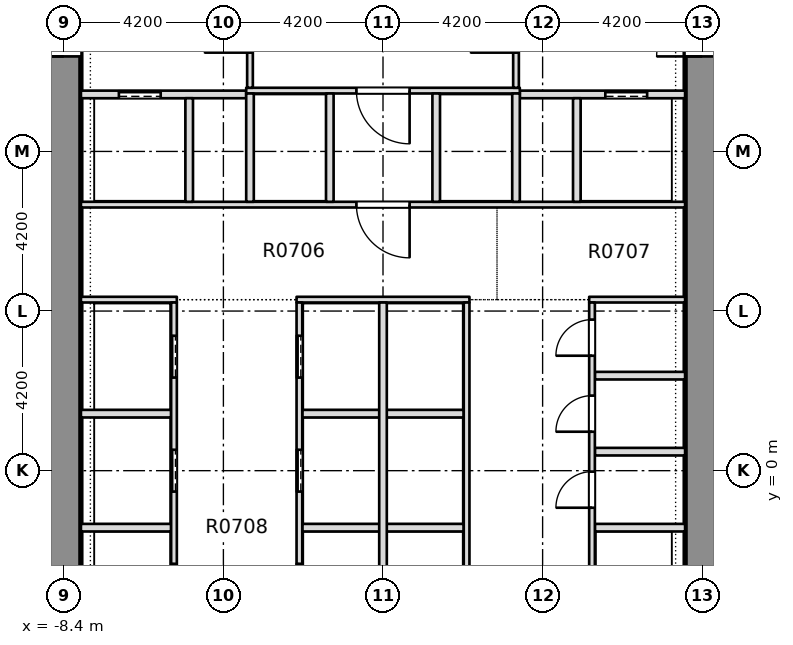
"""IFC4 building model, lengths in metres.
Left out: names, types, materials, properties, quantities, classifications, styles, units other than length and angle.
Written with IfcOpenShell. Run it as: python <this file> out.ifc"""

import sys

from ifc_helpers import new_model, si_unit, direction, frame, frame_2d, origin, place, context, subcontext, project, spatial, rectangle, extrude, element, fill, save


model = new_model("IFC4")
c1 = context("Model", 3, precision=1e-05, world=origin(), true_north=direction((0.0, 1.0)))
c2 = subcontext(c1, "Body", "Model", "MODEL_VIEW")
j1 = project(units=[si_unit("LENGTHUNIT", "METRE"), si_unit("PLANEANGLEUNIT", "RADIAN")], contexts=[c1])
p1 = place(None, origin())
s1 = spatial("IfcSite", under=j1, at=p1, CompositionType="ELEMENT")
p2 = place(p1, origin())
s2 = spatial("IfcBuilding", under=s1, at=p2, CompositionType="ELEMENT")
p3 = place(p2, frame((0.0, 0.0, 37.95)))
s3 = spatial("IfcBuildingStorey", under=s2, at=p3, CompositionType="ELEMENT", Elevation=37.95)
p4 = place(p3, frame((-8.4, -7.5, -0.32), z_axis=(0.0, 0.0, 1.0), x_axis=(0.0, 1.0, 0.0)))
e1 = element("IfcWall", 1, at=p4, inside=s3, PredefinedType="SHEAR", context=c2, shape_type="SweptSolid", body=[
    extrude(rectangle(XDim=28.35, YDim=0.9, at=frame_2d((14.175, 0.0))), origin(), (0.0, 0.0, 1.0), 3.45),
])
p5 = place(p4, frame((18.4, 0.0, 0.32)))
e2 = element("IfcOpeningElement", 2, at=p5, cuts=e1, PredefinedType="OPENING", context=c2, shape_type="SweptSolid", body=[
    extrude(rectangle(XDim=1.2, YDim=2.1, at=frame_2d((0.6, 1.05))), frame((0.0, 0.46, 0.0), z_axis=(0.0, -1.0, 0.0), x_axis=(1.0, 0.0, 0.0)), (0.0, 0.0, 1.0), 0.92),
])
p6 = place(p3, frame((8.4, -7.5, -0.32), z_axis=(0.0, 0.0, 1.0), x_axis=(0.0, 1.0, 0.0)))
e3 = element("IfcWall", 3, at=p6, inside=s3, PredefinedType="SHEAR", context=c2, shape_type="SweptSolid", body=[
    extrude(rectangle(XDim=28.35, YDim=0.9, at=frame_2d((14.175, 0.0))), origin(), (0.0, 0.0, 1.0), 3.45),
])
p7 = place(p6, frame((18.4, 0.0, 0.32)))
e4 = element("IfcOpeningElement", 4, at=p7, cuts=e3, PredefinedType="OPENING", context=c2, shape_type="SweptSolid", body=[
    extrude(rectangle(XDim=1.2, YDim=2.1, at=frame_2d((0.6, 1.05))), frame((0.0, 0.46, 0.0), z_axis=(0.0, -1.0, 0.0), x_axis=(1.0, 0.0, 0.0)), (0.0, 0.0, 1.0), 0.92),
])
p8 = place(p3, frame((-7.949, -1.5, 0.0), z_axis=(0.0, 0.0, 1.0), x_axis=(1.0, 0.0, 0.0)))
e5 = element("IfcWall", 5, at=p8, inside=s3, PredefinedType="PARTITIONING", context=c2, shape_type="SweptSolid", body=[
    extrude(rectangle(XDim=2.374, YDim=0.2, at=frame_2d((1.187, 0.0))), origin(), (0.0, 0.0, 1.0), 3.13),
])
p9 = place(p3, frame((-2.125, -1.5, 0.0), z_axis=(0.0, 0.0, 1.0), x_axis=(1.0, 0.0, 0.0)))
e6 = element("IfcWall", 6, at=p9, inside=s3, PredefinedType="PARTITIONING", context=c2, shape_type="SweptSolid", body=[
    extrude(rectangle(XDim=4.25, YDim=0.2, at=frame_2d((2.125, 0.0))), origin(), (0.0, 0.0, 1.0), 3.13),
])
for number, where, z_axis, x_axis in (
    (7, (5.575, -1.5, 0.0), (0.0, 0.0, 1.0), (1.0, 0.0, 0.0)),
    (8, (5.575, 0.5, 0.0), (0.0, 0.0, 1.0), (1.0, 0.0, 0.0)),
    (9, (-7.949, 1.5, 0.0), (0.0, 0.0, 1.0), (1.0, 0.0, 0.0)),
):
    element("IfcWall", number, at=place(p3, frame(where, z_axis=z_axis, x_axis=x_axis)), inside=s3, PredefinedType="PARTITIONING", context=c2, shape_type="SweptSolid", body=[
        extrude(rectangle(XDim=2.374, YDim=0.2, at=frame_2d((1.187, 0.0))), origin(), (0.0, 0.0, 1.0), 3.13),
    ])
p10 = place(p3, frame((-2.125, 1.5, 0.0), z_axis=(0.0, 0.0, 1.0), x_axis=(1.0, 0.0, 0.0)))
e10 = element("IfcWall", 10, at=p10, inside=s3, PredefinedType="PARTITIONING", context=c2, shape_type="SweptSolid", body=[
    extrude(rectangle(XDim=4.25, YDim=0.2, at=frame_2d((2.125, 0.0))), origin(), (0.0, 0.0, 1.0), 3.13),
])
p11 = place(p3, frame((5.575, 2.5, 0.0), z_axis=(0.0, 0.0, 1.0), x_axis=(1.0, 0.0, 0.0)))
e11 = element("IfcWall", 11, at=p11, inside=s3, PredefinedType="PARTITIONING", context=c2, shape_type="SweptSolid", body=[
    extrude(rectangle(XDim=2.374, YDim=0.2, at=frame_2d((1.187, 0.0))), origin(), (0.0, 0.0, 1.0), 3.13),
])
p12 = place(p3, frame((-7.949, 4.5, 0.0), z_axis=(0.0, 0.0, 1.0), x_axis=(1.0, 0.0, 0.0)))
e12 = element("IfcWall", 12, at=p12, inside=s3, PredefinedType="PARTITIONING", context=c2, shape_type="SweptSolid", body=[
    extrude(rectangle(XDim=2.524, YDim=0.15, at=frame_2d((1.262, 0.0))), origin(), (0.0, 0.0, 1.0), 3.13),
])
p13 = place(p3, frame((-2.275, 4.5, 0.0), z_axis=(0.0, 0.0, 1.0), x_axis=(1.0, 0.0, 0.0)))
e13 = element("IfcWall", 13, at=p13, inside=s3, PredefinedType="PARTITIONING", context=c2, shape_type="SweptSolid", body=[
    extrude(rectangle(XDim=4.55, YDim=0.15, at=frame_2d((2.275, 0.0))), origin(), (0.0, 0.0, 1.0), 3.13),
])
p14 = place(p3, frame((5.425, 4.5, 0.0), z_axis=(0.0, 0.0, 1.0), x_axis=(1.0, 0.0, 0.0)))
e14 = element("IfcWall", 14, at=p14, inside=s3, PredefinedType="PARTITIONING", context=c2, shape_type="SweptSolid", body=[
    extrude(rectangle(XDim=2.524, YDim=0.15, at=frame_2d((1.262, 0.0))), origin(), (0.0, 0.0, 1.0), 3.13),
])
p15 = place(p3, frame((-7.949, 7.0, 0.0), z_axis=(0.0, 0.0, 1.0), x_axis=(1.0, 0.0, 0.0)))
e15 = element("IfcWall", 15, at=p15, inside=s3, PredefinedType="PARTITIONING", context=c2, shape_type="SweptSolid", body=[
    extrude(rectangle(XDim=15.898, YDim=0.15, at=frame_2d((7.949, 0.0))), origin(), (0.0, 0.0, 1.0), 3.13),
])
p16 = place(p15, frame((7.249, 0.0, 0.0)))
e16 = element("IfcOpeningElement", 16, at=p16, cuts=e15, PredefinedType="OPENING", context=c2, shape_type="SweptSolid", body=[
    extrude(rectangle(XDim=1.4, YDim=2.1, at=frame_2d((0.7, 1.05))), frame((0.0, 0.085, 0.0), z_axis=(0.0, -1.0, 0.0), x_axis=(1.0, 0.0, 0.0)), (0.0, 0.0, 1.0), 0.17),
])
p17 = place(p3, frame((-7.949, 9.9, 0.0), z_axis=(0.0, 0.0, 1.0), x_axis=(1.0, 0.0, 0.0)))
e17 = element("IfcWall", 17, at=p17, inside=s3, PredefinedType="PARTITIONING", context=c2, shape_type="SweptSolid", body=[
    extrude(rectangle(XDim=4.349, YDim=0.2, at=frame_2d((2.174, 0.0))), origin(), (0.0, 0.0, 1.0), 3.13),
])
p18 = place(p17, frame((0.999, 0.0, 0.0)))
e18 = element("IfcOpeningElement", 18, at=p18, cuts=e17, PredefinedType="OPENING", context=c2, shape_type="SweptSolid", body=[
    extrude(rectangle(XDim=1.1, YDim=2.1, at=frame_2d((0.55, 1.05))), frame((0.0, 0.11, 0.0), z_axis=(0.0, -1.0, 0.0), x_axis=(1.0, 0.0, 0.0)), (0.0, 0.0, 1.0), 0.22),
])
p19 = place(p3, frame((3.6, 9.9, 0.0), z_axis=(0.0, 0.0, 1.0), x_axis=(1.0, 0.0, 0.0)))
e19 = element("IfcWall", 19, at=p19, inside=s3, PredefinedType="PARTITIONING", context=c2, shape_type="SweptSolid", body=[
    extrude(rectangle(XDim=4.349, YDim=0.2, at=frame_2d((2.174, 0.0))), origin(), (0.0, 0.0, 1.0), 3.13),
])
p20 = place(p19, frame((2.25, 0.0, 0.0)))
e20 = element("IfcOpeningElement", 20, at=p20, cuts=e19, PredefinedType="OPENING", context=c2, shape_type="SweptSolid", body=[
    extrude(rectangle(XDim=1.1, YDim=2.1, at=frame_2d((0.55, 1.05))), frame((0.0, 0.11, 0.0), z_axis=(0.0, -1.0, 0.0), x_axis=(1.0, 0.0, 0.0)), (0.0, 0.0, 1.0), 0.22),
])
p21 = place(p3, frame((-3.6, 10.0, 0.0), z_axis=(0.0, 0.0, 1.0), x_axis=(1.0, 0.0, 0.0)))
e21 = element("IfcWall", 21, at=p21, inside=s3, PredefinedType="PARTITIONING", context=c2, shape_type="SweptSolid", body=[
    extrude(rectangle(XDim=7.2, YDim=0.15, at=frame_2d((3.6, 0.0))), origin(), (0.0, 0.0, 1.0), 3.13),
])
p22 = place(p21, frame((2.9, 0.0, 0.0)))
e22 = element("IfcOpeningElement", 22, at=p22, cuts=e21, PredefinedType="OPENING", context=c2, shape_type="SweptSolid", body=[
    extrude(rectangle(XDim=1.4, YDim=2.1, at=frame_2d((0.7, 1.05))), frame((0.0, 0.085, 0.0), z_axis=(0.0, -1.0, 0.0), x_axis=(1.0, 0.0, 0.0)), (0.0, 0.0, 1.0), 0.17),
])
p23 = place(p3, frame((-5.5, -7.499, 0.0), z_axis=(0.0, 0.0, 1.0), x_axis=(0.0, 1.0, 0.0)))
e23 = element("IfcWall", 23, at=p23, inside=s3, PredefinedType="PARTITIONING", context=c2, shape_type="SweptSolid", body=[
    extrude(rectangle(XDim=11.924, YDim=0.15, at=frame_2d((5.962, 0.0))), origin(), (0.0, 0.0, 1.0), 3.13),
])
p24 = place(p23, frame((0.949, 0.0, 0.0)))
e24 = element("IfcOpeningElement", 24, at=p24, cuts=e23, PredefinedType="OPENING", context=c2, shape_type="SweptSolid", body=[
    extrude(rectangle(XDim=1.1, YDim=2.1, at=frame_2d((0.55, 1.05))), frame((0.0, 0.085, 0.0), z_axis=(0.0, -1.0, 0.0), x_axis=(1.0, 0.0, 0.0)), (0.0, 0.0, 1.0), 0.17),
])
p25 = place(p23, frame((3.949, 0.0, 0.0)))
e25 = element("IfcOpeningElement", 25, at=p25, cuts=e23, PredefinedType="OPENING", context=c2, shape_type="SweptSolid", body=[
    extrude(rectangle(XDim=1.1, YDim=2.1, at=frame_2d((0.55, 1.05))), frame((0.0, 0.085, 0.0), z_axis=(0.0, -1.0, 0.0), x_axis=(1.0, 0.0, 0.0)), (0.0, 0.0, 1.0), 0.17),
])
p26 = place(p23, frame((6.949, 0.0, 0.0)))
e26 = element("IfcOpeningElement", 26, at=p26, cuts=e23, PredefinedType="OPENING", context=c2, shape_type="SweptSolid", body=[
    extrude(rectangle(XDim=1.1, YDim=2.1, at=frame_2d((0.55, 1.05))), frame((0.0, 0.085, 0.0), z_axis=(0.0, -1.0, 0.0), x_axis=(1.0, 0.0, 0.0)), (0.0, 0.0, 1.0), 0.17),
])
p27 = place(p23, frame((9.949, 0.0, 0.0)))
e27 = element("IfcOpeningElement", 27, at=p27, cuts=e23, PredefinedType="OPENING", context=c2, shape_type="SweptSolid", body=[
    extrude(rectangle(XDim=1.1, YDim=2.1, at=frame_2d((0.55, 1.05))), frame((0.0, 0.085, 0.0), z_axis=(0.0, -1.0, 0.0), x_axis=(1.0, 0.0, 0.0)), (0.0, 0.0, 1.0), 0.17),
])
p28 = place(p3, frame((-5.1, 7.075, 0.0), z_axis=(0.0, 0.0, 1.0), x_axis=(0.0, 1.0, 0.0)))
e28 = element("IfcWall", 28, at=p28, inside=s3, PredefinedType="PARTITIONING", context=c2, shape_type="SweptSolid", body=[
    extrude(rectangle(XDim=2.725, YDim=0.2, at=frame_2d((1.363, 0.0))), origin(), (0.0, 0.0, 1.0), 3.13),
])
p29 = place(p3, frame((-3.5, 7.075, 0.0), z_axis=(0.0, 0.0, 1.0), x_axis=(0.0, 1.0, 0.0)))
e29 = element("IfcWall", 29, at=p29, inside=s3, PredefinedType="PARTITIONING", context=c2, shape_type="SweptSolid", body=[
    extrude(rectangle(XDim=2.85, YDim=0.2, at=frame_2d((1.425, 0.0))), origin(), (0.0, 0.0, 1.0), 3.13),
])
p30 = place(p3, frame((-3.5, 10.075, 0.0), z_axis=(0.0, 0.0, 1.0), x_axis=(0.0, 1.0, 0.0)))
e30 = element("IfcWall", 30, at=p30, inside=s3, PredefinedType="PARTITIONING", context=c2, shape_type="SweptSolid", body=[
    extrude(rectangle(XDim=3.075, YDim=0.15, at=frame_2d((1.538, 0.0))), origin(), (0.0, 0.0, 1.0), 3.13),
])
p31 = place(p30, frame((0.925, 0.0, 0.0)))
e31 = element("IfcOpeningElement", 31, at=p31, cuts=e30, PredefinedType="OPENING", context=c2, shape_type="SweptSolid", body=[
    extrude(rectangle(XDim=1.2, YDim=2.1, at=frame_2d((0.6, 1.05))), frame((0.0, 0.085, 0.0), z_axis=(0.0, -1.0, 0.0), x_axis=(1.0, 0.0, 0.0)), (0.0, 0.0, 1.0), 0.17),
])
p32 = place(p3, frame((-2.2, -7.499, 0.0), z_axis=(0.0, 0.0, 1.0), x_axis=(0.0, 1.0, 0.0)))
e32 = element("IfcWall", 32, at=p32, inside=s3, PredefinedType="PARTITIONING", context=c2, shape_type="SweptSolid", body=[
    extrude(rectangle(XDim=11.924, YDim=0.15, at=frame_2d((5.962, 0.0))), origin(), (0.0, 0.0, 1.0), 3.13),
])
p33 = place(p32, frame((0.949, 0.0, 0.0)))
e33 = element("IfcOpeningElement", 33, at=p33, cuts=e32, PredefinedType="OPENING", context=c2, shape_type="SweptSolid", body=[
    extrude(rectangle(XDim=1.1, YDim=2.1, at=frame_2d((0.55, 1.05))), frame((0.0, 0.085, 0.0), z_axis=(0.0, -1.0, 0.0), x_axis=(1.0, 0.0, 0.0)), (0.0, 0.0, 1.0), 0.17),
])
p34 = place(p32, frame((3.949, 0.0, 0.0)))
e34 = element("IfcOpeningElement", 34, at=p34, cuts=e32, PredefinedType="OPENING", context=c2, shape_type="SweptSolid", body=[
    extrude(rectangle(XDim=1.1, YDim=2.1, at=frame_2d((0.55, 1.05))), frame((0.0, 0.085, 0.0), z_axis=(0.0, -1.0, 0.0), x_axis=(1.0, 0.0, 0.0)), (0.0, 0.0, 1.0), 0.17),
])
p35 = place(p32, frame((6.949, 0.0, 0.0)))
e35 = element("IfcOpeningElement", 35, at=p35, cuts=e32, PredefinedType="OPENING", context=c2, shape_type="SweptSolid", body=[
    extrude(rectangle(XDim=1.1, YDim=2.1, at=frame_2d((0.55, 1.05))), frame((0.0, 0.085, 0.0), z_axis=(0.0, -1.0, 0.0), x_axis=(1.0, 0.0, 0.0)), (0.0, 0.0, 1.0), 0.17),
])
p36 = place(p32, frame((9.949, 0.0, 0.0)))
e36 = element("IfcOpeningElement", 36, at=p36, cuts=e32, PredefinedType="OPENING", context=c2, shape_type="SweptSolid", body=[
    extrude(rectangle(XDim=1.1, YDim=2.1, at=frame_2d((0.55, 1.05))), frame((0.0, 0.085, 0.0), z_axis=(0.0, -1.0, 0.0), x_axis=(1.0, 0.0, 0.0)), (0.0, 0.0, 1.0), 0.17),
])
p37 = place(p3, frame((-1.4, 7.075, 0.0), z_axis=(0.0, 0.0, 1.0), x_axis=(0.0, 1.0, 0.0)))
e37 = element("IfcWall", 37, at=p37, inside=s3, PredefinedType="PARTITIONING", context=c2, shape_type="SweptSolid", body=[
    extrude(rectangle(XDim=2.85, YDim=0.2, at=frame_2d((1.425, 0.0))), origin(), (0.0, 0.0, 1.0), 3.13),
])
p38 = place(p3, frame((0.0, -7.499, 0.0), z_axis=(0.0, 0.0, 1.0), x_axis=(0.0, 1.0, 0.0)))
e38 = element("IfcWall", 38, at=p38, inside=s3, PredefinedType="PARTITIONING", context=c2, shape_type="SweptSolid", body=[
    extrude(rectangle(XDim=11.924, YDim=0.2, at=frame_2d((5.962, 0.0))), origin(), (0.0, 0.0, 1.0), 3.13),
])
p39 = place(p3, frame((1.4, 7.075, 0.0), z_axis=(0.0, 0.0, 1.0), x_axis=(0.0, 1.0, 0.0)))
e39 = element("IfcWall", 39, at=p39, inside=s3, PredefinedType="PARTITIONING", context=c2, shape_type="SweptSolid", body=[
    extrude(rectangle(XDim=2.85, YDim=0.2, at=frame_2d((1.425, 0.0))), origin(), (0.0, 0.0, 1.0), 3.13),
])
p40 = place(p3, frame((2.2, -7.499, 0.0), z_axis=(0.0, 0.0, 1.0), x_axis=(0.0, 1.0, 0.0)))
e40 = element("IfcWall", 40, at=p40, inside=s3, PredefinedType="PARTITIONING", context=c2, shape_type="SweptSolid", body=[
    extrude(rectangle(XDim=11.924, YDim=0.15, at=frame_2d((5.962, 0.0))), origin(), (0.0, 0.0, 1.0), 3.13),
])
p41 = place(p3, frame((3.5, 7.075, 0.0), z_axis=(0.0, 0.0, 1.0), x_axis=(0.0, 1.0, 0.0)))
e41 = element("IfcWall", 41, at=p41, inside=s3, PredefinedType="PARTITIONING", context=c2, shape_type="SweptSolid", body=[
    extrude(rectangle(XDim=2.85, YDim=0.2, at=frame_2d((1.425, 0.0))), origin(), (0.0, 0.0, 1.0), 3.13),
])
p42 = place(p3, frame((3.5, 10.075, 0.0), z_axis=(0.0, 0.0, 1.0), x_axis=(0.0, 1.0, 0.0)))
e42 = element("IfcWall", 42, at=p42, inside=s3, PredefinedType="PARTITIONING", context=c2, shape_type="SweptSolid", body=[
    extrude(rectangle(XDim=3.075, YDim=0.15, at=frame_2d((1.538, 0.0))), origin(), (0.0, 0.0, 1.0), 3.13),
])
p43 = place(p42, frame((0.925, 0.0, 0.0)))
e43 = element("IfcOpeningElement", 43, at=p43, cuts=e42, PredefinedType="OPENING", context=c2, shape_type="SweptSolid", body=[
    extrude(rectangle(XDim=1.2, YDim=2.1, at=frame_2d((0.6, 1.05))), frame((0.0, 0.085, 0.0), z_axis=(0.0, -1.0, 0.0), x_axis=(1.0, 0.0, 0.0)), (0.0, 0.0, 1.0), 0.17),
])
p44 = place(p3, frame((5.1, 7.075, 0.0), z_axis=(0.0, 0.0, 1.0), x_axis=(0.0, 1.0, 0.0)))
e44 = element("IfcWall", 44, at=p44, inside=s3, PredefinedType="PARTITIONING", context=c2, shape_type="SweptSolid", body=[
    extrude(rectangle(XDim=2.725, YDim=0.2, at=frame_2d((1.363, 0.0))), origin(), (0.0, 0.0, 1.0), 3.13),
])
p45 = place(p3, frame((5.5, -7.499, 0.0), z_axis=(0.0, 0.0, 1.0), x_axis=(0.0, 1.0, 0.0)))
e45 = element("IfcWall", 45, at=p45, inside=s3, PredefinedType="PARTITIONING", context=c2, shape_type="SweptSolid", body=[
    extrude(rectangle(XDim=11.924, YDim=0.15, at=frame_2d((5.962, 0.0))), origin(), (0.0, 0.0, 1.0), 3.13),
])
p46 = place(p45, frame((6.524, 0.0, 0.0)))
e46 = element("IfcOpeningElement", 46, at=p46, cuts=e45, PredefinedType="OPENING", context=c2, shape_type="SweptSolid", body=[
    extrude(rectangle(XDim=0.95, YDim=2.1, at=frame_2d((0.475, 1.05))), frame((0.0, 0.085, 0.0), z_axis=(0.0, -1.0, 0.0), x_axis=(1.0, 0.0, 0.0)), (0.0, 0.0, 1.0), 0.17),
])
p47 = place(p45, frame((8.524, 0.0, 0.0)))
e47 = element("IfcOpeningElement", 47, at=p47, cuts=e45, PredefinedType="OPENING", context=c2, shape_type="SweptSolid", body=[
    extrude(rectangle(XDim=0.95, YDim=2.1, at=frame_2d((0.475, 1.05))), frame((0.0, 0.085, 0.0), z_axis=(0.0, -1.0, 0.0), x_axis=(1.0, 0.0, 0.0)), (0.0, 0.0, 1.0), 0.17),
])
p48 = place(p45, frame((10.524, 0.0, 0.0)))
e48 = element("IfcOpeningElement", 48, at=p48, cuts=e45, PredefinedType="OPENING", context=c2, shape_type="SweptSolid", body=[
    extrude(rectangle(XDim=0.95, YDim=2.1, at=frame_2d((0.475, 1.05))), frame((0.0, 0.085, 0.0), z_axis=(0.0, -1.0, 0.0), x_axis=(1.0, 0.0, 0.0)), (0.0, 0.0, 1.0), 0.17),
])
p49 = place(p25, origin())
e49 = element("IfcDoor", 49, at=p49, inside=s3, OperationType="SLIDING_TO_RIGHT", PredefinedType="DOOR", context=c2, shape_type="SweptSolid", body=[
    extrude(rectangle(XDim=1.1, YDim=2.1, at=frame_2d((0.55, 1.05))), frame((0.0, 0.025, 0.0), z_axis=(0.0, -1.0, 0.0), x_axis=(1.0, 0.0, 0.0)), (0.0, 0.0, 1.0), 0.05),
])
fill(e25, e49)
p50 = place(p26, origin())
e50 = element("IfcDoor", 50, at=p50, inside=s3, OperationType="SLIDING_TO_RIGHT", PredefinedType="DOOR", context=c2, shape_type="SweptSolid", body=[
    extrude(rectangle(XDim=1.1, YDim=2.1, at=frame_2d((0.55, 1.05))), frame((0.0, 0.025, 0.0), z_axis=(0.0, -1.0, 0.0), x_axis=(1.0, 0.0, 0.0)), (0.0, 0.0, 1.0), 0.05),
])
fill(e26, e50)
p51 = place(p27, origin())
e51 = element("IfcDoor", 51, at=p51, inside=s3, OperationType="SLIDING_TO_RIGHT", PredefinedType="DOOR", context=c2, shape_type="SweptSolid", body=[
    extrude(rectangle(XDim=1.1, YDim=2.1, at=frame_2d((0.55, 1.05))), frame((0.0, 0.025, 0.0), z_axis=(0.0, -1.0, 0.0), x_axis=(1.0, 0.0, 0.0)), (0.0, 0.0, 1.0), 0.05),
])
fill(e27, e51)
p52 = place(p34, origin())
e52 = element("IfcDoor", 52, at=p52, inside=s3, OperationType="SLIDING_TO_RIGHT", PredefinedType="DOOR", context=c2, shape_type="SweptSolid", body=[
    extrude(rectangle(XDim=1.1, YDim=2.1, at=frame_2d((0.55, 1.05))), frame((0.0, 0.025, 0.0), z_axis=(0.0, -1.0, 0.0), x_axis=(1.0, 0.0, 0.0)), (0.0, 0.0, 1.0), 0.05),
])
fill(e34, e52)
p53 = place(p35, origin())
e53 = element("IfcDoor", 53, at=p53, inside=s3, OperationType="SLIDING_TO_RIGHT", PredefinedType="DOOR", context=c2, shape_type="SweptSolid", body=[
    extrude(rectangle(XDim=1.1, YDim=2.1, at=frame_2d((0.55, 1.05))), frame((0.0, 0.025, 0.0), z_axis=(0.0, -1.0, 0.0), x_axis=(1.0, 0.0, 0.0)), (0.0, 0.0, 1.0), 0.05),
])
fill(e35, e53)
p54 = place(p36, origin())
e54 = element("IfcDoor", 54, at=p54, inside=s3, OperationType="SLIDING_TO_RIGHT", PredefinedType="DOOR", context=c2, shape_type="SweptSolid", body=[
    extrude(rectangle(XDim=1.1, YDim=2.1, at=frame_2d((0.55, 1.05))), frame((0.0, 0.025, 0.0), z_axis=(0.0, -1.0, 0.0), x_axis=(1.0, 0.0, 0.0)), (0.0, 0.0, 1.0), 0.05),
])
fill(e36, e54)
p55 = place(p46, origin())
e55 = element("IfcDoor", 55, at=p55, inside=s3, OperationType="SINGLE_SWING_RIGHT", PredefinedType="DOOR", context=c2, shape_type="SweptSolid", body=[
    extrude(rectangle(XDim=0.95, YDim=2.1, at=frame_2d((0.475, 1.05))), frame((0.0, 0.025, 0.0), z_axis=(0.0, -1.0, 0.0), x_axis=(1.0, 0.0, 0.0)), (0.0, 0.0, 1.0), 0.05),
])
fill(e46, e55)
p56 = place(p47, origin())
e56 = element("IfcDoor", 56, at=p56, inside=s3, OperationType="SINGLE_SWING_LEFT", PredefinedType="DOOR", context=c2, shape_type="SweptSolid", body=[
    extrude(rectangle(XDim=0.95, YDim=2.1, at=frame_2d((0.475, 1.05))), frame((0.0, 0.025, 0.0), z_axis=(0.0, -1.0, 0.0), x_axis=(1.0, 0.0, 0.0)), (0.0, 0.0, 1.0), 0.05),
])
fill(e47, e56)
p57 = place(p48, origin())
e57 = element("IfcDoor", 57, at=p57, inside=s3, OperationType="SINGLE_SWING_RIGHT", PredefinedType="DOOR", context=c2, shape_type="SweptSolid", body=[
    extrude(rectangle(XDim=0.95, YDim=2.1, at=frame_2d((0.475, 1.05))), frame((0.0, 0.025, 0.0), z_axis=(0.0, -1.0, 0.0), x_axis=(1.0, 0.0, 0.0)), (0.0, 0.0, 1.0), 0.05),
])
fill(e48, e57)
p58 = place(p18, origin())
e58 = element("IfcDoor", 58, at=p58, inside=s3, OperationType="SLIDING_TO_RIGHT", PredefinedType="DOOR", context=c2, shape_type="SweptSolid", body=[
    extrude(rectangle(XDim=1.1, YDim=2.1, at=frame_2d((0.55, 1.05))), frame((0.0, 0.025, 0.0), z_axis=(0.0, -1.0, 0.0), x_axis=(1.0, 0.0, 0.0)), (0.0, 0.0, 1.0), 0.05),
])
fill(e18, e58)
p59 = place(p20, origin())
e59 = element("IfcDoor", 59, at=p59, inside=s3, OperationType="SLIDING_TO_LEFT", PredefinedType="DOOR", context=c2, shape_type="SweptSolid", body=[
    extrude(rectangle(XDim=1.1, YDim=2.1, at=frame_2d((0.55, 1.05))), frame((0.0, 0.025, 0.0), z_axis=(0.0, -1.0, 0.0), x_axis=(1.0, 0.0, 0.0)), (0.0, 0.0, 1.0), 0.05),
])
fill(e20, e59)
p60 = place(p16, origin())
e60 = element("IfcDoor", 60, at=p60, inside=s3, OperationType="SINGLE_SWING_RIGHT", PredefinedType="DOOR", context=c2, shape_type="SweptSolid", body=[
    extrude(rectangle(XDim=1.4, YDim=2.1, at=frame_2d((0.7, 1.05))), frame((0.0, 0.025, 0.0), z_axis=(0.0, -1.0, 0.0), x_axis=(1.0, 0.0, 0.0)), (0.0, 0.0, 1.0), 0.05),
])
fill(e16, e60)
p61 = place(p22, origin())
e61 = element("IfcDoor", 61, at=p61, inside=s3, OperationType="SINGLE_SWING_RIGHT", PredefinedType="DOOR", context=c2, shape_type="SweptSolid", body=[
    extrude(rectangle(XDim=1.4, YDim=2.1, at=frame_2d((0.7, 1.05))), frame((0.0, 0.025, 0.0), z_axis=(0.0, -1.0, 0.0), x_axis=(1.0, 0.0, 0.0)), (0.0, 0.0, 1.0), 0.05),
])
fill(e22, e61)
p62 = place(p5, origin())
e62 = element("IfcDoor", 62, at=p62, inside=s3, OperationType="SINGLE_SWING_LEFT", PredefinedType="DOOR", context=c2, shape_type="SweptSolid", body=[
    extrude(rectangle(XDim=1.2, YDim=2.1, at=frame_2d((0.6, 1.05))), frame((0.0, 0.025, 0.0), z_axis=(0.0, -1.0, 0.0), x_axis=(1.0, 0.0, 0.0)), (0.0, 0.0, 1.0), 0.05),
])
fill(e2, e62)
p63 = place(p7, origin())
e63 = element("IfcDoor", 63, at=p63, inside=s3, OperationType="SINGLE_SWING_LEFT", PredefinedType="DOOR", context=c2, shape_type="SweptSolid", body=[
    extrude(rectangle(XDim=1.2, YDim=2.1, at=frame_2d((0.6, 1.05))), frame((0.0, 0.025, 0.0), z_axis=(0.0, -1.0, 0.0), x_axis=(1.0, 0.0, 0.0)), (0.0, 0.0, 1.0), 0.05),
])
fill(e4, e63)
save(model, sys.argv[1])
